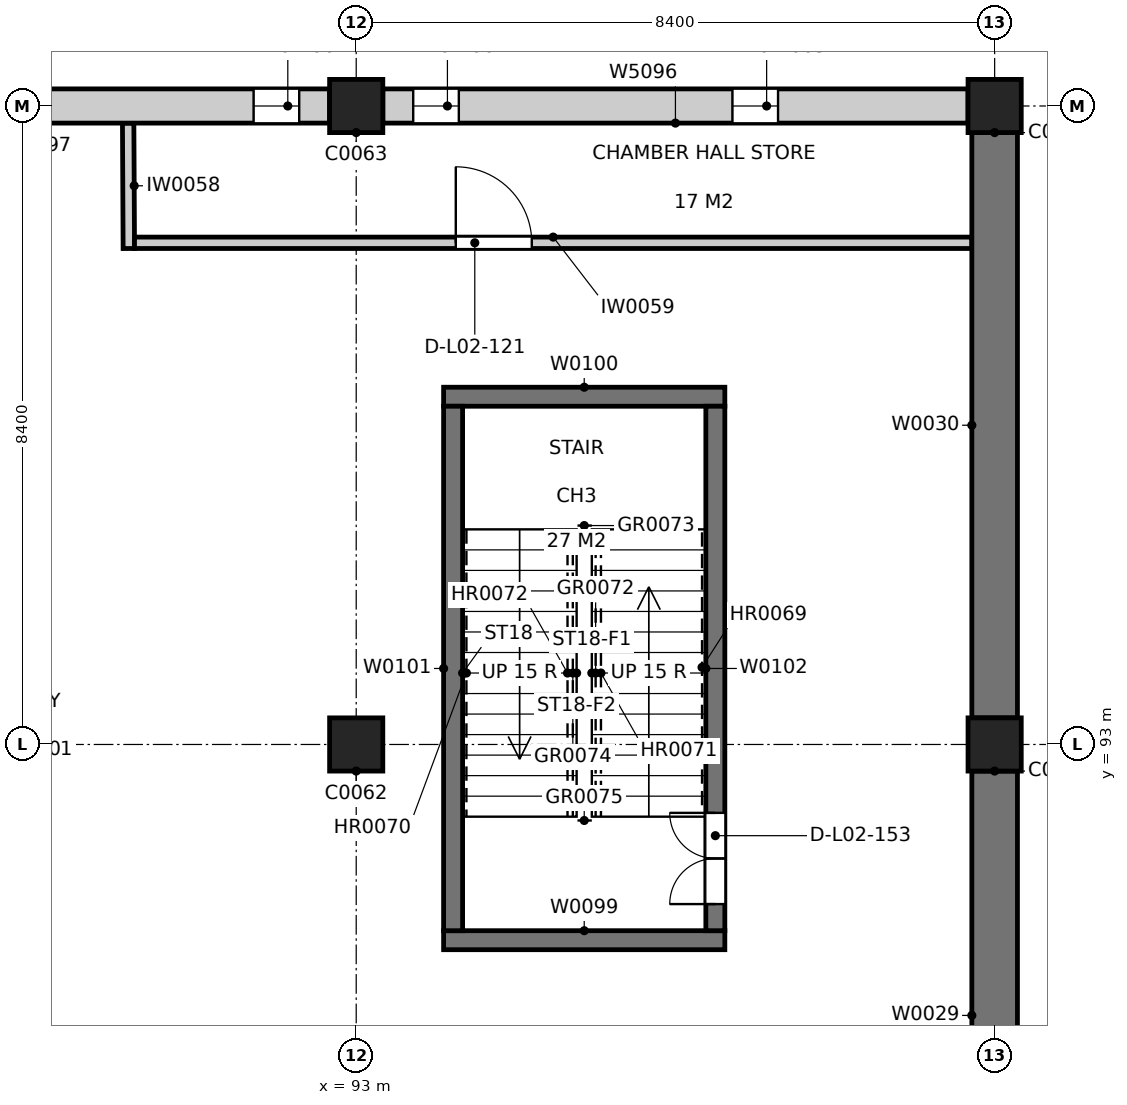
"""IFC4 building model, lengths in metres.
Left out: names, types, materials, properties, quantities, classifications, styles, units other than length and angle.
Written with IfcOpenShell. Run it as: python <this file> out.ifc"""

import sys

from ifc_helpers import new_model, si_unit, direction, frame, frame_2d, origin, origin_2d, place, context, subcontext, project, spatial, rectangle, extrude, element, fill, save


model = new_model("IFC4")
c1 = context("Model", 3, precision=1e-05, world=origin(), true_north=direction((0.0, 1.0)))
c2 = subcontext(c1, "Body", "Model", "MODEL_VIEW")
j1 = project(units=[si_unit("LENGTHUNIT", "METRE"), si_unit("PLANEANGLEUNIT", "RADIAN")], contexts=[c1])
p1 = place(None, origin())
s1 = spatial("IfcSite", under=j1, at=p1, CompositionType="ELEMENT")
p2 = place(p1, origin())
s2 = spatial("IfcBuilding", under=s1, at=p2, CompositionType="ELEMENT")
p3 = place(p2, frame((0.0, 0.0, 9.6)))
s3 = spatial("IfcBuildingStorey", under=s2, at=p3, CompositionType="ELEMENT", Elevation=9.6)
for number, where, z_axis, x_axis in (
    (1, (93.0, 93.0, 0.0), (0.0, 0.0, 1.0), (1.0, 0.0, 0.0)),
    (2, (93.0, 101.4, 0.0), (0.0, 0.0, 1.0), (1.0, 0.0, 0.0)),
    (3, (101.4, 93.0, 0.0), (0.0, 0.0, 1.0), (1.0, 0.0, 0.0)),
    (4, (101.4, 101.4, 0.0), (0.0, 0.0, 1.0), (1.0, 0.0, 0.0)),
):
    element("IfcColumn", number, at=place(p3, frame(where, z_axis=z_axis, x_axis=x_axis)), inside=s3, PredefinedType="COLUMN", context=c2, shape_type="SweptSolid", body=[
        extrude(rectangle(XDim=0.7, YDim=0.7, at=origin_2d()), origin(), (0.0, 0.0, 1.0), 4.8),
    ])
for number, where, z_axis, x_axis in (
    (5, (101.4, 84.95, 0.0), (0.0, 0.0, 1.0), (0.0, 1.0, 0.0)),
    (6, (101.4, 93.35, 0.0), (0.0, 0.0, 1.0), (0.0, 1.0, 0.0)),
):
    element("IfcWall", number, at=place(p3, frame(where, z_axis=z_axis, x_axis=x_axis)), inside=s3, PredefinedType="SOLIDWALL", context=c2, shape_type="SweptSolid", body=[
        extrude(rectangle(XDim=7.7, YDim=0.6, at=frame_2d((3.85, 0.0))), origin(), (0.0, 0.0, 1.0), 4.8),
    ])
for number, where, z_axis, x_axis in (
    (7, (94.15, 90.425, 0.0), (0.0, 0.0, 1.0), (1.0, 0.0, 0.0)),
    (8, (94.15, 97.575, 0.0), (0.0, 0.0, 1.0), (1.0, 0.0, 0.0)),
):
    element("IfcWall", number, at=place(p3, frame(where, z_axis=z_axis, x_axis=x_axis)), inside=s3, PredefinedType="SOLIDWALL", context=c2, shape_type="SweptSolid", body=[
        extrude(rectangle(XDim=3.7, YDim=0.25, at=frame_2d((1.85, 0.0))), origin(), (0.0, 0.0, 1.0), 4.8),
    ])
p4 = place(p3, frame((94.275, 90.55, 0.0), z_axis=(0.0, 0.0, 1.0), x_axis=(0.0, 1.0, 0.0)))
e9 = element("IfcWall", 9, at=p4, inside=s3, PredefinedType="SOLIDWALL", context=c2, shape_type="SweptSolid", body=[
    extrude(rectangle(XDim=6.9, YDim=0.25, at=frame_2d((3.45, 0.0))), origin(), (0.0, 0.0, 1.0), 4.8),
])
p5 = place(p3, frame((97.725, 90.55, 0.0), z_axis=(0.0, 0.0, 1.0), x_axis=(0.0, 1.0, 0.0)))
e10 = element("IfcWall", 10, at=p5, inside=s3, PredefinedType="SOLIDWALL", context=c2, shape_type="SweptSolid", body=[
    extrude(rectangle(XDim=6.9, YDim=0.25, at=frame_2d((3.45, 0.0))), origin(), (0.0, 0.0, 1.0), 4.8),
])
p6 = place(p5, frame((0.35, 0.0, 0.0)))
e11 = element("IfcOpeningElement", 11, at=p6, cuts=e10, PredefinedType="OPENING", context=c2, shape_type="SweptSolid", body=[
    extrude(rectangle(XDim=1.2, YDim=2.1, at=frame_2d((0.6, 1.05))), frame((0.0, 0.135, 0.0), z_axis=(0.0, -1.0, 0.0), x_axis=(1.0, 0.0, 0.0)), (0.0, 0.0, 1.0), 0.27),
])
p7 = place(p3, frame((90.0, 101.175, 0.0), z_axis=(0.0, 0.0, 1.0), x_axis=(0.005326944247, -0.999985811732, 0.0)))
e12 = element("IfcWall", 12, at=p7, inside=s3, PredefinedType="PARTITIONING", context=c2, shape_type="SweptSolid", body=[
    extrude(rectangle(XDim=1.65, YDim=0.15, at=frame_2d((0.825, 0.0))), origin(), (0.0, 0.0, 1.0), 4.6),
])
p8 = place(p3, frame((90.083, 99.6, 0.0), z_axis=(0.0, 0.0, 1.0), x_axis=(1.0, 0.0, 0.0)))
e13 = element("IfcWall", 13, at=p8, inside=s3, PredefinedType="PARTITIONING", context=c2, shape_type="SweptSolid", body=[
    extrude(rectangle(XDim=11.017, YDim=0.15, at=frame_2d((5.509, 0.0))), origin(), (0.0, 0.0, 1.0), 3.8),
])
p9 = place(p8, frame((4.227, 0.0, 0.0)))
e14 = element("IfcOpeningElement", 14, at=p9, cuts=e13, PredefinedType="OPENING", context=c2, shape_type="SweptSolid", body=[
    extrude(rectangle(XDim=1.0, YDim=2.1, at=frame_2d((0.5, 1.05))), frame((0.0, 0.085, 0.0), z_axis=(0.0, -1.0, 0.0), x_axis=(1.0, 0.0, 0.0)), (0.0, 0.0, 1.0), 0.17),
])
p10 = place(p3, frame((101.05, 101.4, 0.0), z_axis=(0.0, 0.0, 1.0), x_axis=(-1.0, 0.0, 0.0)))
e15 = element("IfcWall", 15, at=p10, inside=s3, PredefinedType="SOLIDWALL", context=c2, shape_type="SweptSolid", body=[
    extrude(rectangle(XDim=7.7, YDim=0.45, at=frame_2d((3.85, 0.0))), origin(), (0.0, 0.0, 1.0), 3.8),
])
p11 = place(p10, frame((6.7, 0.0, 2.1)))
e16 = element("IfcOpeningElement", 16, at=p11, cuts=e15, PredefinedType="OPENING", context=c2, shape_type="SweptSolid", body=[
    extrude(rectangle(XDim=0.6, YDim=0.9, at=frame_2d((0.3, 0.45))), frame((0.0, 0.235, 0.0), z_axis=(0.0, -1.0, 0.0), x_axis=(1.0, 0.0, 0.0)), (0.0, 0.0, 1.0), 0.47),
])
p12 = place(p10, frame((2.5, 0.0, 2.1)))
e17 = element("IfcOpeningElement", 17, at=p12, cuts=e15, PredefinedType="OPENING", context=c2, shape_type="SweptSolid", body=[
    extrude(rectangle(XDim=0.6, YDim=0.9, at=frame_2d((0.3, 0.45))), frame((0.0, 0.235, 0.0), z_axis=(0.0, -1.0, 0.0), x_axis=(1.0, 0.0, 0.0)), (0.0, 0.0, 1.0), 0.47),
])
p13 = place(p3, frame((92.65, 101.4, 0.0), z_axis=(0.0, 0.0, 1.0), x_axis=(-1.0, 0.0, 0.0)))
e18 = element("IfcWall", 18, at=p13, inside=s3, PredefinedType="SOLIDWALL", context=c2, shape_type="SweptSolid", body=[
    extrude(rectangle(XDim=7.7, YDim=0.45, at=frame_2d((3.85, 0.0))), origin(), (0.0, 0.0, 1.0), 3.8),
])
p14 = place(p13, frame((0.4, 0.0, 2.1)))
e19 = element("IfcOpeningElement", 19, at=p14, cuts=e18, PredefinedType="OPENING", context=c2, shape_type="SweptSolid", body=[
    extrude(rectangle(XDim=0.6, YDim=0.9, at=frame_2d((0.3, 0.45))), frame((0.0, 0.235, 0.0), z_axis=(0.0, -1.0, 0.0), x_axis=(1.0, 0.0, 0.0)), (0.0, 0.0, 1.0), 0.47),
])
p15 = place(p9, origin())
e20 = element("IfcDoor", 20, at=p15, inside=s3, OperationType="SINGLE_SWING_LEFT", PredefinedType="DOOR", context=c2, shape_type="SweptSolid", body=[
    extrude(rectangle(XDim=1.0, YDim=2.1, at=frame_2d((0.5, 1.05))), frame((0.0, 0.025, 0.0), z_axis=(0.0, -1.0, 0.0), x_axis=(1.0, 0.0, 0.0)), (0.0, 0.0, 1.0), 0.05),
])
fill(e14, e20)
p16 = place(p6, origin())
e21 = element("IfcDoor", 21, at=p16, inside=s3, OperationType="DOUBLE_DOOR_SINGLE_SWING", PredefinedType="DOOR", context=c2, shape_type="SweptSolid", body=[
    extrude(rectangle(XDim=1.2, YDim=2.1, at=frame_2d((0.6, 1.05))), frame((0.0, 0.025, 0.0), z_axis=(0.0, -1.0, 0.0), x_axis=(1.0, 0.0, 0.0)), (0.0, 0.0, 1.0), 0.05),
])
fill(e11, e21)
p17 = place(p11, origin())
e22 = element("IfcWindow", 22, at=p17, inside=s3, PartitioningType="SINGLE_PANEL", PredefinedType="WINDOW", context=c2, shape_type="SweptSolid", body=[
    extrude(rectangle(XDim=0.6, YDim=0.9, at=frame_2d((0.3, 0.45))), frame((0.0, 0.035, 0.0), z_axis=(0.0, -1.0, 0.0), x_axis=(1.0, 0.0, 0.0)), (0.0, 0.0, 1.0), 0.06),
])
fill(e16, e22)
p18 = place(p12, origin())
e23 = element("IfcWindow", 23, at=p18, inside=s3, PartitioningType="SINGLE_PANEL", PredefinedType="WINDOW", context=c2, shape_type="SweptSolid", body=[
    extrude(rectangle(XDim=0.6, YDim=0.9, at=frame_2d((0.3, 0.45))), frame((0.0, 0.035, 0.0), z_axis=(0.0, -1.0, 0.0), x_axis=(1.0, 0.0, 0.0)), (0.0, 0.0, 1.0), 0.06),
])
fill(e17, e23)
p19 = place(p14, origin())
e24 = element("IfcWindow", 24, at=p19, inside=s3, PartitioningType="SINGLE_PANEL", PredefinedType="WINDOW", context=c2, shape_type="SweptSolid", body=[
    extrude(rectangle(XDim=0.6, YDim=0.9, at=frame_2d((0.3, 0.45))), frame((0.0, 0.035, 0.0), z_axis=(0.0, -1.0, 0.0), x_axis=(1.0, 0.0, 0.0)), (0.0, 0.0, 1.0), 0.06),
])
fill(e19, e24)
save(model, sys.argv[1])
